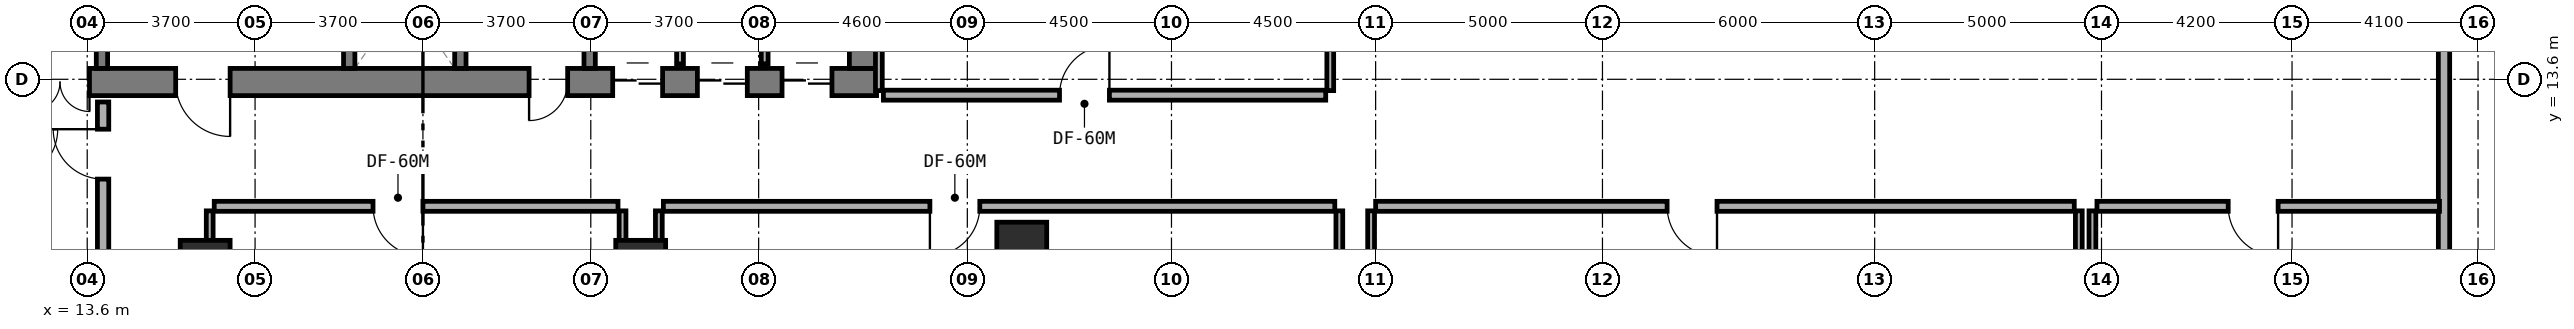
"""IFC4 building model, lengths in metres.
Left out: names, types, materials, properties, quantities, classifications, styles, units other than length and angle.
Written with IfcOpenShell. Run it as: python <this file> out.ifc"""

import sys

from ifc_helpers import new_model, si_unit, direction, frame, frame_2d, origin, origin_2d, place, context, subcontext, project, spatial, rectangle, extrude, element, fill, save


model = new_model("IFC4")
c1 = context("Model", 3, precision=1e-05, world=origin(), true_north=direction((0.0, 1.0)))
c2 = subcontext(c1, "Body", "Model", "MODEL_VIEW")
j1 = project(units=[si_unit("LENGTHUNIT", "METRE"), si_unit("PLANEANGLEUNIT", "RADIAN")], contexts=[c1])
p1 = place(None, origin())
s1 = spatial("IfcSite", under=j1, at=p1, CompositionType="ELEMENT")
p2 = place(p1, origin())
s2 = spatial("IfcBuilding", under=s1, at=p2, CompositionType="ELEMENT")
p3 = place(p2, origin())
s3 = spatial("IfcBuildingStorey", under=s2, at=p3, CompositionType="ELEMENT", Elevation=0.0)
p4 = place(p3, frame((6.2, 13.54, 0.0), z_axis=(0.0, 0.0, 1.0), x_axis=(1.0, 0.0, 0.0)))
e1 = element("IfcWall", 1, at=p4, inside=s3, PredefinedType="SHEAR", context=c2, shape_type="SweptSolid", body=[
    extrude(rectangle(XDim=24.8, YDim=0.6, at=frame_2d((12.4, 0.0))), origin(), (0.0, 0.0, 1.0), 5.4),
])
p5 = place(p4, frame((9.35, 0.0, 0.0)))
e2 = element("IfcOpeningElement", 2, at=p5, cuts=e1, PredefinedType="OPENING", context=c2, shape_type="SweptSolid", body=[
    extrude(rectangle(XDim=1.2, YDim=2.15, at=frame_2d((0.6, 1.075))), frame((0.0, 0.31, 0.0), z_axis=(0.0, -1.0, 0.0), x_axis=(1.0, 0.0, 0.0)), (0.0, 0.0, 1.0), 0.62),
])
p6 = place(p4, frame((6.15, 0.0, 0.0)))
e3 = element("IfcOpeningElement", 3, at=p6, cuts=e1, PredefinedType="OPENING", context=c2, shape_type="SweptSolid", body=[
    extrude(rectangle(XDim=1.3, YDim=2.15, at=frame_2d((0.65, 1.075))), frame((0.0, 0.31, 0.0), z_axis=(0.0, -1.0, 0.0), x_axis=(1.0, 0.0, 0.0)), (0.0, 0.0, 1.0), 0.62),
])
p7 = place(p4, frame((17.14, 0.0, 0.0)))
e4 = element("IfcOpeningElement", 4, at=p7, cuts=e1, PredefinedType="OPENING", context=c2, shape_type="SweptSolid", body=[
    extrude(rectangle(XDim=0.85, YDim=2.1, at=frame_2d((0.425, 1.05))), frame((0.0, 0.31, 0.0), z_axis=(0.0, -1.0, 0.0), x_axis=(1.0, 0.0, 0.0)), (0.0, 0.0, 1.0), 0.62),
])
p8 = place(p4, frame((18.983, 0.0, 0.0)))
e5 = element("IfcOpeningElement", 5, at=p8, cuts=e1, PredefinedType="OPENING", context=c2, shape_type="SweptSolid", body=[
    extrude(rectangle(XDim=1.1, YDim=2.15, at=frame_2d((0.55, 1.075))), frame((0.0, 0.31, 0.0), z_axis=(0.0, -1.0, 0.0), x_axis=(1.0, 0.0, 0.0)), (0.0, 0.0, 1.0), 0.62),
])
p9 = place(p4, frame((20.85, 0.0, 0.0)))
e6 = element("IfcOpeningElement", 6, at=p9, cuts=e1, PredefinedType="OPENING", context=c2, shape_type="SweptSolid", body=[
    extrude(rectangle(XDim=1.1, YDim=2.15, at=frame_2d((0.55, 1.075))), frame((0.0, 0.31, 0.0), z_axis=(0.0, -1.0, 0.0), x_axis=(1.0, 0.0, 0.0)), (0.0, 0.0, 1.0), 0.62),
])
p10 = place(p4, frame((22.716, 0.0, 0.0)))
e7 = element("IfcOpeningElement", 7, at=p10, cuts=e1, PredefinedType="OPENING", context=c2, shape_type="SweptSolid", body=[
    extrude(rectangle(XDim=1.1, YDim=2.15, at=frame_2d((0.55, 1.075))), frame((0.0, 0.31, 0.0), z_axis=(0.0, -1.0, 0.0), x_axis=(1.0, 0.0, 0.0)), (0.0, 0.0, 1.0), 0.62),
])
p11 = place(p3, frame((30.7, 13.84, 0.0), z_axis=(0.0, 0.0, 1.0), x_axis=(0.0, 1.0, 0.0)))
e8 = element("IfcWall", 8, at=p11, inside=s3, PredefinedType="SHEAR", context=c2, shape_type="SweptSolid", body=[
    extrude(rectangle(XDim=3.16, YDim=0.6, at=frame_2d((1.58, 0.0))), origin(), (0.0, 0.0, 1.0), 5.4),
])
p12 = place(p3, frame((13.925, 13.84, 0.0), z_axis=(0.0, 0.0, 1.0), x_axis=(0.0, 1.0, 0.0)))
e9 = element("IfcWall", 9, at=p12, inside=s3, PredefinedType="STANDARD", context=c2, shape_type="SweptSolid", body=[
    extrude(rectangle(XDim=3.16, YDim=0.25, at=frame_2d((1.58, 0.0))), origin(), (0.0, 0.0, 1.0), 5.05),
])
p13 = place(p12, frame((0.98, 0.0, 0.0)))
e10 = element("IfcOpeningElement", 10, at=p13, cuts=e9, PredefinedType="OPENING", context=c2, shape_type="SweptSolid", body=[
    extrude(rectangle(XDim=1.1, YDim=2.15, at=frame_2d((0.55, 1.075))), frame((0.0, 0.135, 0.0), z_axis=(0.0, -1.0, 0.0), x_axis=(1.0, 0.0, 0.0)), (0.0, 0.0, 1.0), 0.27),
])
p14 = place(p3, frame((19.375, 13.84, 0.0), z_axis=(0.0, 0.0, 1.0), x_axis=(0.0, 1.0, 0.0)))
e11 = element("IfcWall", 11, at=p14, inside=s3, PredefinedType="STANDARD", context=c2, shape_type="SweptSolid", body=[
    extrude(rectangle(XDim=3.16, YDim=0.25, at=frame_2d((1.58, 0.0))), origin(), (0.0, 0.0, 1.0), 5.05),
])
p15 = place(p14, frame((0.98, 0.0, 0.0)))
e12 = element("IfcOpeningElement", 12, at=p15, cuts=e11, PredefinedType="OPENING", context=c2, shape_type="SweptSolid", body=[
    extrude(rectangle(XDim=1.1, YDim=2.15, at=frame_2d((0.55, 1.075))), frame((0.0, 0.135, 0.0), z_axis=(0.0, -1.0, 0.0), x_axis=(1.0, 0.0, 0.0)), (0.0, 0.0, 1.0), 0.27),
])
for number, where, z_axis, x_axis in (
    (13, (21.825, 13.84, 0.0), (0.0, 0.0, 1.0), (0.0, 1.0, 0.0)),
    (14, (24.675, 13.84, 0.0), (0.0, 0.0, 1.0), (0.0, 1.0, 0.0)),
):
    element("IfcWall", number, at=place(p3, frame(where, z_axis=z_axis, x_axis=x_axis)), inside=s3, PredefinedType="STANDARD", context=c2, shape_type="SweptSolid", body=[
        extrude(rectangle(XDim=3.16, YDim=0.25, at=frame_2d((1.58, 0.0))), origin(), (0.0, 0.0, 1.0), 5.05),
    ])
for number, where, z_axis, x_axis in (
    (15, (16.2, 9.4, 0.0), (0.0, 0.0, 1.0), (1.0, 0.0, 0.0)),
    (16, (25.8, 9.4, 0.0), (0.0, 0.0, 1.0), (1.0, 0.0, 0.0)),
    (17, (34.2, 9.8, 0.0), (0.0, 0.0, 1.0), (1.0, 0.0, 0.0)),
):
    element("IfcColumn", number, at=place(p3, frame(where, z_axis=z_axis, x_axis=x_axis)), inside=s3, PredefinedType="COLUMN", context=c2, shape_type="SweptSolid", body=[
        extrude(rectangle(XDim=1.1, YDim=1.3, at=origin_2d()), origin(), (0.0, 0.0, 1.0), 5.4),
    ])
p16 = place(p3, frame((26.667, 13.94, 0.0), z_axis=(0.0, 0.0, 1.0), x_axis=(0.0, 1.0, 0.0)))
e18 = element("IfcWall", 18, at=p16, inside=s3, PredefinedType="PARTITIONING", context=c2, shape_type="SweptSolid", body=[
    extrude(rectangle(XDim=2.96, YDim=0.15, at=frame_2d((1.48, 0.0))), origin(), (0.0, 0.0, 1.0), 5.05),
])
p17 = place(p3, frame((28.533, 13.94, 0.0), z_axis=(0.0, 0.0, 1.0), x_axis=(0.0, 1.0, 0.0)))
e19 = element("IfcWall", 19, at=p17, inside=s3, PredefinedType="PARTITIONING", context=c2, shape_type="SweptSolid", body=[
    extrude(rectangle(XDim=2.96, YDim=0.15, at=frame_2d((1.48, 0.0))), origin(), (0.0, 0.0, 1.0), 4.125),
])
p18 = place(p3, frame((13.95, 0.45, 0.0), z_axis=(0.0, 0.0, 1.0), x_axis=(0.0, 1.0, 0.0)))
e20 = element("IfcWall", 20, at=p18, inside=s3, PredefinedType="SOLIDWALL", context=c2, shape_type="SweptSolid", body=[
    extrude(rectangle(XDim=12.65, YDim=0.25, at=frame_2d((6.325, 0.0))), origin(), (0.0, 0.0, 1.0), 4.225),
])
p19 = place(p18, frame((10.95, 0.0, 0.0)))
e21 = element("IfcOpeningElement", 21, at=p19, cuts=e20, PredefinedType="OPENING", context=c2, shape_type="SweptSolid", body=[
    extrude(rectangle(XDim=1.1, YDim=2.15, at=frame_2d((0.55, 1.075))), frame((0.0, 0.135, 0.0), z_axis=(0.0, -1.0, 0.0), x_axis=(1.0, 0.0, 0.0)), (0.0, 0.0, 1.0), 0.27),
])
p20 = place(p3, frame((65.55, 0.48, 0.0), z_axis=(0.0, 0.0, 1.0), x_axis=(0.0, 1.0, 0.0)))
e22 = element("IfcWall", 22, at=p20, inside=s3, PredefinedType="SOLIDWALL", context=c2, shape_type="SweptSolid", body=[
    extrude(rectangle(XDim=22.67, YDim=0.25, at=frame_2d((11.335, 0.0))), origin(), (0.0, 0.0, 1.0), 4.225),
])
p21 = place(p3, frame((31.05, 13.35, 0.0), z_axis=(0.0, 0.0, 1.0), x_axis=(0.0, 1.0, 0.0)))
e23 = element("IfcWall", 23, at=p21, inside=s3, PredefinedType="PARTITIONING", context=c2, shape_type="SweptSolid", body=[
    extrude(rectangle(XDim=18.75, YDim=0.15, at=frame_2d((9.375, 0.0))), origin(), (0.0, 0.0, 1.0), 4.025),
])
p22 = place(p3, frame((41.0, 13.35, 0.0), z_axis=(0.0, 0.0, 1.0), x_axis=(0.0, 1.0, 0.0)))
e24 = element("IfcWall", 24, at=p22, inside=s3, PredefinedType="PARTITIONING", context=c2, shape_type="SweptSolid", body=[
    extrude(rectangle(XDim=18.75, YDim=0.15, at=frame_2d((9.375, 0.0))), origin(), (0.0, 0.0, 1.0), 4.525),
])
p23 = place(p3, frame((31.15, 13.25, 0.0), z_axis=(0.0, 0.0, 1.0), x_axis=(1.0, 0.0, 0.0)))
e25 = element("IfcWall", 25, at=p23, inside=s3, PredefinedType="SOLIDWALL", context=c2, shape_type="SweptSolid", body=[
    extrude(rectangle(XDim=9.75, YDim=0.22, at=frame_2d((4.875, 0.0))), origin(), (0.0, 0.0, 1.0), 4.575),
])
p24 = place(p23, frame((3.882, 0.0, 0.0)))
e26 = element("IfcOpeningElement", 26, at=p24, cuts=e25, PredefinedType="OPENING", context=c2, shape_type="SweptSolid", body=[
    extrude(rectangle(XDim=1.1, YDim=2.1, at=frame_2d((0.55, 1.05))), frame((0.0, 0.12, 0.0), z_axis=(0.0, -1.0, 0.0), x_axis=(1.0, 0.0, 0.0)), (0.0, 0.0, 1.0), 0.24),
])
for number, where, z_axis, x_axis in (
    (27, (16.3, 0.48, 0.0), (0.0, 0.0, 1.0), (0.0, 1.0, 0.0)),
    (28, (25.4, 0.48, 0.0), (0.0, 0.0, 1.0), (0.0, 1.0, 0.0)),
):
    element("IfcWall", number, at=place(p3, frame(where, z_axis=z_axis, x_axis=x_axis)), inside=s3, PredefinedType="PARTITIONING", context=c2, shape_type="SweptSolid", body=[
        extrude(rectangle(XDim=10.22, YDim=0.15, at=frame_2d((5.11, 0.0))), origin(), (0.0, 0.0, 1.0), 4.425),
    ])
p25 = place(p3, frame((16.4, 10.8, 0.0), z_axis=(0.0, 0.0, 1.0), x_axis=(1.0, 0.0, 0.0)))
e29 = element("IfcWall", 29, at=p25, inside=s3, PredefinedType="SOLIDWALL", context=c2, shape_type="SweptSolid", body=[
    extrude(rectangle(XDim=8.9, YDim=0.22, at=frame_2d((4.45, 0.0))), origin(), (0.0, 0.0, 1.0), 5.05),
])
p26 = place(p25, frame((3.5, 0.0, 0.0)))
e30 = element("IfcOpeningElement", 30, at=p26, cuts=e29, PredefinedType="OPENING", context=c2, shape_type="SweptSolid", body=[
    extrude(rectangle(XDim=1.1, YDim=2.1, at=frame_2d((0.55, 1.05))), frame((0.0, 0.12, 0.0), z_axis=(0.0, -1.0, 0.0), x_axis=(1.0, 0.0, 0.0)), (0.0, 0.0, 1.0), 0.24),
])
p27 = place(p3, frame((26.2, 0.45, 0.0), z_axis=(0.0, 0.0, 1.0), x_axis=(0.0, 1.0, 0.0)))
e31 = element("IfcWall", 31, at=p27, inside=s3, PredefinedType="PARTITIONING", context=c2, shape_type="SweptSolid", body=[
    extrude(rectangle(XDim=10.25, YDim=0.15, at=frame_2d((5.125, 0.0))), origin(), (0.0, 0.0, 1.0), 4.125),
])
p28 = place(p3, frame((41.2, 0.45, 0.0), z_axis=(0.0, 0.0, 1.0), x_axis=(0.0, 1.0, 0.0)))
e32 = element("IfcWall", 32, at=p28, inside=s3, PredefinedType="PARTITIONING", context=c2, shape_type="SweptSolid", body=[
    extrude(rectangle(XDim=10.25, YDim=0.15, at=frame_2d((5.125, 0.0))), origin(), (0.0, 0.0, 1.0), 4.225),
])
p29 = place(p3, frame((26.3, 10.8, 0.0), z_axis=(0.0, 0.0, 1.0), x_axis=(1.0, 0.0, 0.0)))
e33 = element("IfcWall", 33, at=p29, inside=s3, PredefinedType="SOLIDWALL", context=c2, shape_type="SweptSolid", body=[
    extrude(rectangle(XDim=14.8, YDim=0.22, at=frame_2d((7.4, 0.0))), origin(), (0.0, 0.0, 1.0), 4.125),
])
p30 = place(p29, frame((5.875, 0.0, 0.0)))
e34 = element("IfcOpeningElement", 34, at=p30, cuts=e33, PredefinedType="OPENING", context=c2, shape_type="SweptSolid", body=[
    extrude(rectangle(XDim=1.1, YDim=2.1, at=frame_2d((0.55, 1.05))), frame((0.0, 0.12, 0.0), z_axis=(0.0, -1.0, 0.0), x_axis=(1.0, 0.0, 0.0)), (0.0, 0.0, 1.0), 0.24),
])
for number, where, z_axis, x_axis in (
    (35, (41.9, 0.5, 0.0), (0.0, 0.0, 1.0), (0.0, 1.0, 0.0)),
    (36, (57.5, 0.5, 0.0), (0.0, 0.0, 1.0), (0.0, 1.0, 0.0)),
):
    element("IfcWall", number, at=place(p3, frame(where, z_axis=z_axis, x_axis=x_axis)), inside=s3, PredefinedType="PARTITIONING", context=c2, shape_type="SweptSolid", body=[
        extrude(rectangle(XDim=10.2, YDim=0.15, at=frame_2d((5.1, 0.0))), origin(), (0.0, 0.0, 1.0), 4.225),
    ])
p31 = place(p3, frame((42.0, 10.8, 0.0), z_axis=(0.0, 0.0, 1.0), x_axis=(1.0, 0.0, 0.0)))
e37 = element("IfcWall", 37, at=p31, inside=s3, PredefinedType="SOLIDWALL", context=c2, shape_type="SweptSolid", body=[
    extrude(rectangle(XDim=15.4, YDim=0.22, at=frame_2d((7.7, 0.0))), origin(), (0.0, 0.0, 1.0), 5.05),
])
p32 = place(p31, frame((6.425, 0.0, 0.0)))
e38 = element("IfcOpeningElement", 38, at=p32, cuts=e37, PredefinedType="OPENING", context=c2, shape_type="SweptSolid", body=[
    extrude(rectangle(XDim=1.1, YDim=2.1, at=frame_2d((0.55, 1.05))), frame((0.0, 0.12, 0.0), z_axis=(0.0, -1.0, 0.0), x_axis=(1.0, 0.0, 0.0)), (0.0, 0.0, 1.0), 0.24),
])
p33 = place(p3, frame((57.8, 0.48, 0.0), z_axis=(0.0, 0.0, 1.0), x_axis=(0.0, 1.0, 0.0)))
e39 = element("IfcWall", 39, at=p33, inside=s3, PredefinedType="PARTITIONING", context=c2, shape_type="SweptSolid", body=[
    extrude(rectangle(XDim=10.22, YDim=0.15, at=frame_2d((5.11, 0.0))), origin(), (0.0, 0.0, 1.0), 4.225),
])
p34 = place(p3, frame((57.9, 10.8, 0.0), z_axis=(0.0, 0.0, 1.0), x_axis=(1.0, 0.0, 0.0)))
e40 = element("IfcWall", 40, at=p34, inside=s3, PredefinedType="SOLIDWALL", context=c2, shape_type="SweptSolid", body=[
    extrude(rectangle(XDim=7.55, YDim=0.22, at=frame_2d((3.775, 0.0))), origin(), (0.0, 0.0, 1.0), 4.665),
])
p35 = place(p34, frame((2.893, 0.0, 0.0)))
e41 = element("IfcOpeningElement", 41, at=p35, cuts=e40, PredefinedType="OPENING", context=c2, shape_type="SweptSolid", body=[
    extrude(rectangle(XDim=1.1, YDim=2.1, at=frame_2d((0.55, 1.05))), frame((0.0, 0.12, 0.0), z_axis=(0.0, -1.0, 0.0), x_axis=(1.0, 0.0, 0.0)), (0.0, 0.0, 1.0), 0.24),
])
p36 = place(p5, frame((1.2, 0.0, 0.0), z_axis=(0.0, 0.0, 1.0), x_axis=(-1.0, 0.0, 0.0)))
e42 = element("IfcDoor", 42, at=p36, inside=s3, OperationType="SINGLE_SWING_LEFT", PredefinedType="DOOR", context=c2, shape_type="SweptSolid", body=[
    extrude(rectangle(XDim=1.2, YDim=2.15, at=frame_2d((0.6, 1.075))), frame((0.0, 0.025, 0.0), z_axis=(0.0, -1.0, 0.0), x_axis=(1.0, 0.0, 0.0)), (0.0, 0.0, 1.0), 0.05),
])
fill(e2, e42)
p37 = place(p6, frame((1.3, 0.0, 0.0), z_axis=(0.0, 0.0, 1.0), x_axis=(-1.0, 0.0, 0.0)))
e43 = element("IfcDoor", 43, at=p37, inside=s3, OperationType="DOUBLE_DOOR_SINGLE_SWING", PredefinedType="DOOR", context=c2, shape_type="SweptSolid", body=[
    extrude(rectangle(XDim=1.3, YDim=2.15, at=frame_2d((0.65, 1.075))), frame((0.0, 0.025, 0.0), z_axis=(0.0, -1.0, 0.0), x_axis=(1.0, 0.0, 0.0)), (0.0, 0.0, 1.0), 0.05),
])
fill(e3, e43)
p38 = place(p7, frame((0.85, 0.0, 0.0), z_axis=(0.0, 0.0, 1.0), x_axis=(-1.0, 0.0, 0.0)))
e44 = element("IfcDoor", 44, at=p38, inside=s3, OperationType="SINGLE_SWING_RIGHT", PredefinedType="DOOR", context=c2, shape_type="SweptSolid", body=[
    extrude(rectangle(XDim=0.85, YDim=2.1, at=frame_2d((0.425, 1.05))), frame((0.0, 0.025, 0.0), z_axis=(0.0, -1.0, 0.0), x_axis=(1.0, 0.0, 0.0)), (0.0, 0.0, 1.0), 0.05),
])
fill(e4, e44)
p39 = place(p8, frame((1.1, 0.0, 0.0), z_axis=(0.0, 0.0, 1.0), x_axis=(-1.0, 0.0, 0.0)))
e45 = element("IfcDoor", 45, at=p39, inside=s3, OperationType="DOUBLE_DOOR_SLIDING", PredefinedType="DOOR", context=c2, shape_type="SweptSolid", body=[
    extrude(rectangle(XDim=1.1, YDim=2.15, at=frame_2d((0.55, 1.075))), frame((0.0, 0.025, 0.0), z_axis=(0.0, -1.0, 0.0), x_axis=(1.0, 0.0, 0.0)), (0.0, 0.0, 1.0), 0.05),
])
fill(e5, e45)
p40 = place(p9, frame((1.1, 0.0, 0.0), z_axis=(0.0, 0.0, 1.0), x_axis=(-1.0, 0.0, 0.0)))
e46 = element("IfcDoor", 46, at=p40, inside=s3, OperationType="DOUBLE_DOOR_SLIDING", PredefinedType="DOOR", context=c2, shape_type="SweptSolid", body=[
    extrude(rectangle(XDim=1.1, YDim=2.15, at=frame_2d((0.55, 1.075))), frame((0.0, 0.025, 0.0), z_axis=(0.0, -1.0, 0.0), x_axis=(1.0, 0.0, 0.0)), (0.0, 0.0, 1.0), 0.05),
])
fill(e6, e46)
p41 = place(p10, frame((1.1, 0.0, 0.0), z_axis=(0.0, 0.0, 1.0), x_axis=(-1.0, 0.0, 0.0)))
e47 = element("IfcDoor", 47, at=p41, inside=s3, OperationType="DOUBLE_DOOR_SLIDING", PredefinedType="DOOR", context=c2, shape_type="SweptSolid", body=[
    extrude(rectangle(XDim=1.1, YDim=2.15, at=frame_2d((0.55, 1.075))), frame((0.0, 0.025, 0.0), z_axis=(0.0, -1.0, 0.0), x_axis=(1.0, 0.0, 0.0)), (0.0, 0.0, 1.0), 0.05),
])
fill(e7, e47)
p42 = place(p19, origin())
e48 = element("IfcDoor", 48, at=p42, inside=s3, OperationType="SINGLE_SWING_RIGHT", PredefinedType="DOOR", context=c2, shape_type="SweptSolid", body=[
    extrude(rectangle(XDim=1.1, YDim=2.15, at=frame_2d((0.55, 1.075))), frame((0.0, 0.025, 0.0), z_axis=(0.0, -1.0, 0.0), x_axis=(1.0, 0.0, 0.0)), (0.0, 0.0, 1.0), 0.05),
])
fill(e21, e48)
p43 = place(p24, origin())
e49 = element("IfcDoor", 49, at=p43, inside=s3, OperationType="SINGLE_SWING_RIGHT", PredefinedType="DOOR", context=c2, shape_type="SweptSolid", body=[
    extrude(rectangle(XDim=1.1, YDim=2.1, at=frame_2d((0.55, 1.05))), frame((0.0, 0.025, 0.0), z_axis=(0.0, -1.0, 0.0), x_axis=(1.0, 0.0, 0.0)), (0.0, 0.0, 1.0), 0.05),
])
fill(e26, e49)
p44 = place(p26, frame((1.1, 0.0, 0.0), z_axis=(0.0, 0.0, 1.0), x_axis=(-1.0, 0.0, 0.0)))
e50 = element("IfcDoor", 50, at=p44, inside=s3, OperationType="SINGLE_SWING_LEFT", PredefinedType="DOOR", context=c2, shape_type="SweptSolid", body=[
    extrude(rectangle(XDim=1.1, YDim=2.1, at=frame_2d((0.55, 1.05))), frame((0.0, 0.025, 0.0), z_axis=(0.0, -1.0, 0.0), x_axis=(1.0, 0.0, 0.0)), (0.0, 0.0, 1.0), 0.05),
])
fill(e30, e50)
p45 = place(p30, frame((1.1, 0.0, 0.0), z_axis=(0.0, 0.0, 1.0), x_axis=(-1.0, 0.0, 0.0)))
e51 = element("IfcDoor", 51, at=p45, inside=s3, OperationType="SINGLE_SWING_RIGHT", PredefinedType="DOOR", context=c2, shape_type="SweptSolid", body=[
    extrude(rectangle(XDim=1.1, YDim=2.1, at=frame_2d((0.55, 1.05))), frame((0.0, 0.025, 0.0), z_axis=(0.0, -1.0, 0.0), x_axis=(1.0, 0.0, 0.0)), (0.0, 0.0, 1.0), 0.05),
])
fill(e34, e51)
p46 = place(p32, frame((1.1, 0.0, 0.0), z_axis=(0.0, 0.0, 1.0), x_axis=(-1.0, 0.0, 0.0)))
e52 = element("IfcDoor", 52, at=p46, inside=s3, OperationType="SINGLE_SWING_LEFT", PredefinedType="DOOR", context=c2, shape_type="SweptSolid", body=[
    extrude(rectangle(XDim=1.1, YDim=2.1, at=frame_2d((0.55, 1.05))), frame((0.0, 0.025, 0.0), z_axis=(0.0, -1.0, 0.0), x_axis=(1.0, 0.0, 0.0)), (0.0, 0.0, 1.0), 0.05),
])
fill(e38, e52)
p47 = place(p35, frame((1.1, 0.0, 0.0), z_axis=(0.0, 0.0, 1.0), x_axis=(-1.0, 0.0, 0.0)))
e53 = element("IfcDoor", 53, at=p47, inside=s3, OperationType="SINGLE_SWING_LEFT", PredefinedType="DOOR", context=c2, shape_type="SweptSolid", body=[
    extrude(rectangle(XDim=1.1, YDim=2.1, at=frame_2d((0.55, 1.05))), frame((0.0, 0.025, 0.0), z_axis=(0.0, -1.0, 0.0), x_axis=(1.0, 0.0, 0.0)), (0.0, 0.0, 1.0), 0.05),
])
fill(e41, e53)
save(model, sys.argv[1])
